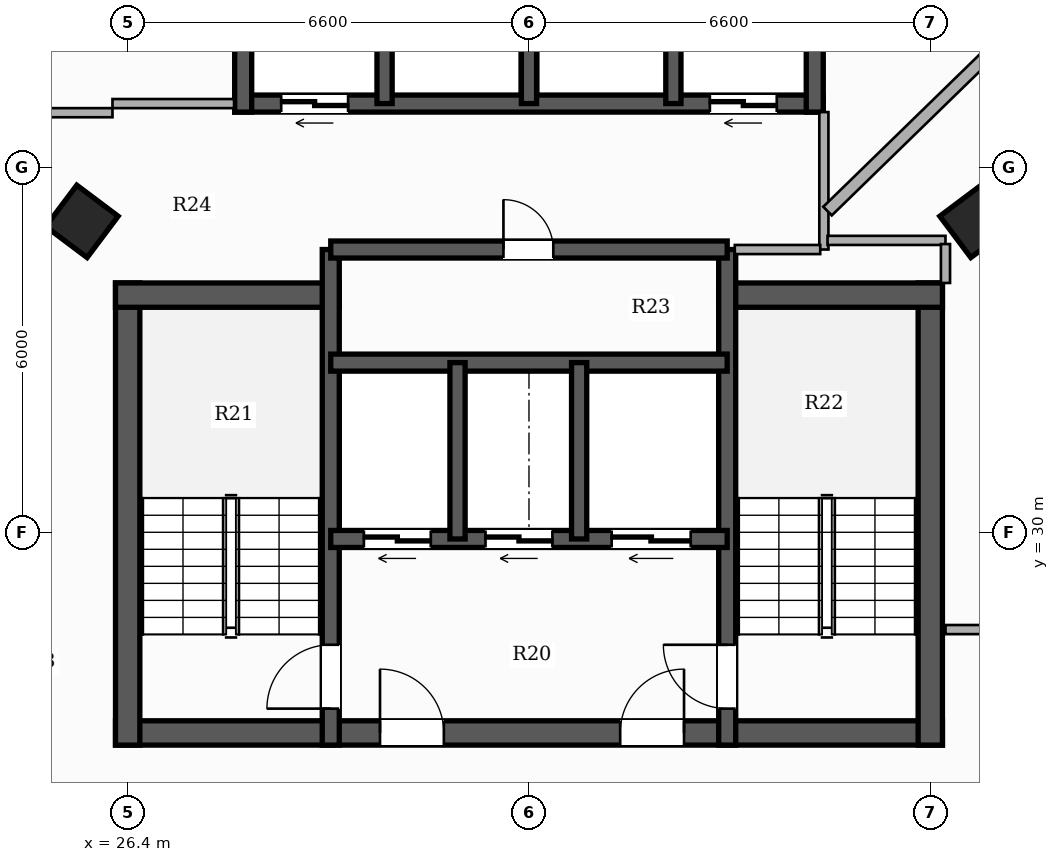
"""IFC4 building model, lengths in metres.
Left out: names, types, materials, properties, quantities, classifications, styles, units other than length and angle.
Written with IfcOpenShell. Run it as: python <this file> out.ifc"""

import sys

from ifc_helpers import new_model, si_unit, direction, frame, frame_2d, origin, origin_2d, place, context, subcontext, project, spatial, rectangle, hollow_rectangle, extrude, element, fill, save


model = new_model("IFC4")
c1 = context("Model", 3, precision=1e-05, world=origin(), true_north=direction((0.0, 1.0)))
c2 = subcontext(c1, "Body", "Model", "MODEL_VIEW")
j1 = project(units=[si_unit("LENGTHUNIT", "METRE"), si_unit("PLANEANGLEUNIT", "RADIAN")], contexts=[c1])
p1 = place(None, origin())
s1 = spatial("IfcSite", under=j1, at=p1, CompositionType="ELEMENT")
p2 = place(p1, origin())
s2 = spatial("IfcBuilding", under=s1, at=p2, CompositionType="ELEMENT")
p3 = place(p2, frame((0.0, 0.0, 113.3)))
s3 = spatial("IfcBuildingStorey", under=s2, at=p3, CompositionType="ELEMENT", Elevation=113.3)
p4 = place(p3, frame((26.2, 26.7, 0.0), z_axis=(0.0, 0.0, 1.0), x_axis=(1.0, 0.0, 0.0)))
e1 = element("IfcWall", 1, at=p4, inside=s3, PredefinedType="SHEAR", context=c2, shape_type="SweptSolid", body=[
    extrude(rectangle(XDim=13.6, YDim=0.4, at=frame_2d((6.8, 0.0))), origin(), (0.0, 0.0, 1.0), 3.3),
])
p5 = place(p4, frame((4.35, 0.0, 0.0)))
e2 = element("IfcOpeningElement", 2, at=p5, cuts=e1, PredefinedType="OPENING", context=c2, shape_type="SweptSolid", body=[
    extrude(rectangle(XDim=1.05, YDim=2.15, at=frame_2d((0.525, 1.075))), frame((0.0, 0.21, 0.0), z_axis=(0.0, -1.0, 0.0), x_axis=(1.0, 0.0, 0.0)), (0.0, 0.0, 1.0), 0.42),
])
p6 = place(p4, frame((8.3, 0.0, 0.0)))
e3 = element("IfcOpeningElement", 3, at=p6, cuts=e1, PredefinedType="OPENING", context=c2, shape_type="SweptSolid", body=[
    extrude(rectangle(XDim=1.05, YDim=2.15, at=frame_2d((0.525, 1.075))), frame((0.0, 0.21, 0.0), z_axis=(0.0, -1.0, 0.0), x_axis=(1.0, 0.0, 0.0)), (0.0, 0.0, 1.0), 0.42),
])
p7 = place(p3, frame((26.4, 26.5, 0.0), z_axis=(0.0, 0.0, 1.0), x_axis=(0.0, 1.0, 0.0)))
e4 = element("IfcWall", 4, at=p7, inside=s3, PredefinedType="SHEAR", context=c2, shape_type="SweptSolid", body=[
    extrude(rectangle(XDim=7.6, YDim=0.4, at=frame_2d((3.8, 0.0))), origin(), (0.0, 0.0, 1.0), 3.3),
])
p8 = place(p3, frame((26.2, 33.9, 0.0), z_axis=(0.0, 0.0, 1.0), x_axis=(1.0, 0.0, 0.0)))
e5 = element("IfcWall", 5, at=p8, inside=s3, PredefinedType="SHEAR", context=c2, shape_type="SweptSolid", body=[
    extrude(rectangle(XDim=3.68, YDim=0.4, at=frame_2d((1.84, 0.0))), origin(), (0.0, 0.0, 1.0), 3.3),
])
p9 = place(p3, frame((39.6, 26.5, 0.0), z_axis=(0.0, 0.0, 1.0), x_axis=(0.0, 1.0, 0.0)))
e6 = element("IfcWall", 6, at=p9, inside=s3, PredefinedType="SHEAR", context=c2, shape_type="SweptSolid", body=[
    extrude(rectangle(XDim=7.6, YDim=0.4, at=frame_2d((3.8, 0.0))), origin(), (0.0, 0.0, 1.0), 3.3),
])
p10 = place(p3, frame((36.12, 33.9, 0.0), z_axis=(0.0, 0.0, 1.0), x_axis=(1.0, 0.0, 0.0)))
e7 = element("IfcWall", 7, at=p10, inside=s3, PredefinedType="SHEAR", context=c2, shape_type="SweptSolid", body=[
    extrude(rectangle(XDim=3.68, YDim=0.4, at=frame_2d((1.84, 0.0))), origin(), (0.0, 0.0, 1.0), 3.3),
])
p11 = place(p3, frame((29.74, 26.5, 0.0), z_axis=(0.0, 0.0, 1.0), x_axis=(0.0, 1.0, 0.0)))
e8 = element("IfcWall", 8, at=p11, inside=s3, PredefinedType="SHEAR", context=c2, shape_type="SweptSolid", body=[
    extrude(rectangle(XDim=8.15, YDim=0.28, at=frame_2d((4.075, 0.0))), origin(), (0.0, 0.0, 1.0), 3.3),
])
p12 = place(p11, frame((0.6, 0.0, 0.0)))
e9 = element("IfcOpeningElement", 9, at=p12, cuts=e8, PredefinedType="OPENING", context=c2, shape_type="SweptSolid", body=[
    extrude(rectangle(XDim=1.05, YDim=2.15, at=frame_2d((0.525, 1.075))), frame((0.0, 0.15, 0.0), z_axis=(0.0, -1.0, 0.0), x_axis=(1.0, 0.0, 0.0)), (0.0, 0.0, 1.0), 0.3),
])
p13 = place(p3, frame((36.26, 26.5, 0.0), z_axis=(0.0, 0.0, 1.0), x_axis=(0.0, 1.0, 0.0)))
e10 = element("IfcWall", 10, at=p13, inside=s3, PredefinedType="SHEAR", context=c2, shape_type="SweptSolid", body=[
    extrude(rectangle(XDim=8.15, YDim=0.28, at=frame_2d((4.075, 0.0))), origin(), (0.0, 0.0, 1.0), 3.3),
])
p14 = place(p13, frame((0.6, 0.0, 0.0)))
e11 = element("IfcOpeningElement", 11, at=p14, cuts=e10, PredefinedType="OPENING", context=c2, shape_type="SweptSolid", body=[
    extrude(rectangle(XDim=1.05, YDim=2.15, at=frame_2d((0.525, 1.075))), frame((0.0, 0.15, 0.0), z_axis=(0.0, -1.0, 0.0), x_axis=(1.0, 0.0, 0.0)), (0.0, 0.0, 1.0), 0.3),
])
p15 = place(p3, frame((36.26, 29.89, 0.0), z_axis=(0.0, 0.0, 1.0), x_axis=(-1.0, 0.0, 0.0)))
e12 = element("IfcWall", 12, at=p15, inside=s3, PredefinedType="SHEAR", context=c2, shape_type="SweptSolid", body=[
    extrude(rectangle(XDim=6.52, YDim=0.28, at=frame_2d((3.26, 0.0))), origin(), (0.0, 0.0, 1.0), 3.3),
])
p16 = place(p15, frame((4.875, 0.0, 0.0)))
e13 = element("IfcOpeningElement", 13, at=p16, cuts=e12, PredefinedType="OPENING", context=c2, shape_type="SweptSolid", body=[
    extrude(rectangle(XDim=1.1, YDim=2.2, at=frame_2d((0.55, 1.1))), frame((0.0, 0.15, 0.0), z_axis=(0.0, -1.0, 0.0), x_axis=(1.0, 0.0, 0.0)), (0.0, 0.0, 1.0), 0.3),
])
p17 = place(p15, frame((2.875, 0.0, 0.0)))
e14 = element("IfcOpeningElement", 14, at=p17, cuts=e12, PredefinedType="OPENING", context=c2, shape_type="SweptSolid", body=[
    extrude(rectangle(XDim=1.1, YDim=2.2, at=frame_2d((0.55, 1.1))), frame((0.0, 0.15, 0.0), z_axis=(0.0, -1.0, 0.0), x_axis=(1.0, 0.0, 0.0)), (0.0, 0.0, 1.0), 0.3),
])
p18 = place(p15, frame((0.6, 0.0, 0.0)))
e15 = element("IfcOpeningElement", 15, at=p18, cuts=e12, PredefinedType="OPENING", context=c2, shape_type="SweptSolid", body=[
    extrude(rectangle(XDim=1.3, YDim=2.2, at=frame_2d((0.65, 1.1))), frame((0.0, 0.15, 0.0), z_axis=(0.0, -1.0, 0.0), x_axis=(1.0, 0.0, 0.0)), (0.0, 0.0, 1.0), 0.3),
])
p19 = place(p3, frame((29.74, 32.79, 0.0), z_axis=(0.0, 0.0, 1.0), x_axis=(1.0, 0.0, 0.0)))
e16 = element("IfcWall", 16, at=p19, inside=s3, PredefinedType="SHEAR", context=c2, shape_type="SweptSolid", body=[
    extrude(rectangle(XDim=6.52, YDim=0.28, at=frame_2d((3.26, 0.0))), origin(), (0.0, 0.0, 1.0), 3.3),
])
for number, where, z_axis, x_axis in (
    (17, (31.825, 29.89, 0.0), (0.0, 0.0, 1.0), (0.0, 1.0, 0.0)),
    (18, (33.825, 29.89, 0.0), (0.0, 0.0, 1.0), (0.0, 1.0, 0.0)),
):
    element("IfcWall", number, at=place(p3, frame(where, z_axis=z_axis, x_axis=x_axis)), inside=s3, PredefinedType="SHEAR", context=c2, shape_type="SweptSolid", body=[
        extrude(rectangle(XDim=2.9, YDim=0.25, at=frame_2d((1.45, 0.0))), origin(), (0.0, 0.0, 1.0), 3.3),
    ])
p20 = place(p3, frame((29.74, 34.65, 0.0), z_axis=(0.0, 0.0, 1.0), x_axis=(1.0, 0.0, 0.0)))
e19 = element("IfcWall", 19, at=p20, inside=s3, PredefinedType="SHEAR", context=c2, shape_type="SweptSolid", body=[
    extrude(rectangle(XDim=6.52, YDim=0.28, at=frame_2d((3.26, 0.0))), origin(), (0.0, 0.0, 1.0), 3.3),
])
p21 = place(p20, frame((2.84, 0.0, 0.0)))
e20 = element("IfcOpeningElement", 20, at=p21, cuts=e19, PredefinedType="OPENING", context=c2, shape_type="SweptSolid", body=[
    extrude(rectangle(XDim=0.82, YDim=2.1, at=frame_2d((0.41, 1.05))), frame((0.0, 0.15, 0.0), z_axis=(0.0, -1.0, 0.0), x_axis=(1.0, 0.0, 0.0)), (0.0, 0.0, 1.0), 0.3),
])
p22 = place(p3, frame((37.84, 37.05, 0.0), z_axis=(0.0, 0.0, 1.0), x_axis=(-1.0, 0.0, 0.0)))
e21 = element("IfcWall", 21, at=p22, inside=s3, PredefinedType="SHEAR", context=c2, shape_type="SweptSolid", body=[
    extrude(rectangle(XDim=9.68, YDim=0.28, at=frame_2d((4.84, 0.0))), origin(), (0.0, 0.0, 1.0), 3.3),
])
p23 = place(p22, frame((7.815, 0.0, 0.0)))
e22 = element("IfcOpeningElement", 22, at=p23, cuts=e21, PredefinedType="OPENING", context=c2, shape_type="SweptSolid", body=[
    extrude(rectangle(XDim=1.1, YDim=2.2, at=frame_2d((0.55, 1.1))), frame((0.0, 0.15, 0.0), z_axis=(0.0, -1.0, 0.0), x_axis=(1.0, 0.0, 0.0)), (0.0, 0.0, 1.0), 0.3),
])
p24 = place(p22, frame((0.765, 0.0, 0.0)))
e23 = element("IfcOpeningElement", 23, at=p24, cuts=e21, PredefinedType="OPENING", context=c2, shape_type="SweptSolid", body=[
    extrude(rectangle(XDim=1.1, YDim=2.2, at=frame_2d((0.55, 1.1))), frame((0.0, 0.15, 0.0), z_axis=(0.0, -1.0, 0.0), x_axis=(1.0, 0.0, 0.0)), (0.0, 0.0, 1.0), 0.3),
])
for number, where, z_axis, x_axis in (
    (24, (28.3, 36.91, 0.0), (0.0, 0.0, 1.0), (0.0, 1.0, 0.0)),
    (25, (37.7, 36.91, 0.0), (0.0, 0.0, 1.0), (0.0, 1.0, 0.0)),
):
    element("IfcWall", number, at=place(p3, frame(where, z_axis=z_axis, x_axis=x_axis)), inside=s3, PredefinedType="SHEAR", context=c2, shape_type="SweptSolid", body=[
        extrude(rectangle(XDim=2.83, YDim=0.28, at=frame_2d((1.415, 0.0))), origin(), (0.0, 0.0, 1.0), 3.3),
    ])
for number, where, z_axis, x_axis in (
    (26, (30.625, 37.05, 0.0), (0.0, 0.0, 1.0), (0.0, 1.0, 0.0)),
    (27, (33.0, 37.05, 0.0), (0.0, 0.0, 1.0), (0.0, 1.0, 0.0)),
    (28, (35.375, 37.05, 0.0), (0.0, 0.0, 1.0), (0.0, 1.0, 0.0)),
):
    element("IfcWall", number, at=place(p3, frame(where, z_axis=z_axis, x_axis=x_axis)), inside=s3, PredefinedType="SHEAR", context=c2, shape_type="SweptSolid", body=[
        extrude(rectangle(XDim=2.55, YDim=0.25, at=frame_2d((1.275, 0.0))), origin(), (0.0, 0.0, 1.0), 3.3),
    ])
for number, where, z_axis, x_axis in (
    (29, (25.648, 35.113, 0.0), (0.0, 0.0, 1.0), (0.6, 0.8, 0.0)),
    (30, (40.352, 35.113, 0.0), (0.0, 0.0, 1.0), (-0.6, 0.8, 0.0)),
):
    element("IfcColumn", number, at=place(p3, frame(where, z_axis=z_axis, x_axis=x_axis)), inside=s3, PredefinedType="COLUMN", context=c2, shape_type="SweptSolid", body=[
        extrude(hollow_rectangle(XDim=0.85, YDim=0.85, WallThickness=0.028, at=origin_2d()), origin(), (0.0, 0.0, 1.0), 3.3),
    ])
p25 = place(p3, frame((37.85, 34.65, 0.0), z_axis=(0.0, 0.0, 1.0), x_axis=(0.0, 1.0, 0.0)))
e31 = element("IfcWall", 31, at=p25, inside=s3, PredefinedType="PARTITIONING", context=c2, shape_type="SweptSolid", body=[
    extrude(rectangle(XDim=2.26, YDim=0.15, at=frame_2d((1.13, 0.0))), origin(), (0.0, 0.0, 1.0), 3.06),
])
p26 = place(p3, frame((36.385, 34.65, 0.0), z_axis=(0.0, 0.0, 1.0), x_axis=(1.0, 0.0, 0.0)))
e32 = element("IfcWall", 32, at=p26, inside=s3, PredefinedType="PARTITIONING", context=c2, shape_type="SweptSolid", body=[
    extrude(rectangle(XDim=1.405, YDim=0.15, at=frame_2d((0.703, 0.0))), origin(), (0.0, 0.0, 1.0), 2.425),
])
p27 = place(p3, frame((23.56, 36.9, 0.0), z_axis=(0.0, 0.0, 1.0), x_axis=(1.0, 0.0, 0.0)))
e33 = element("IfcWall", 33, at=p27, inside=s3, PredefinedType="PARTITIONING", context=c2, shape_type="SweptSolid", body=[
    extrude(rectangle(XDim=2.59, YDim=0.15, at=frame_2d((1.295, 0.0))), origin(), (0.0, 0.0, 1.0), 2.413),
])
p28 = place(p27, frame((0.515, 0.0, 0.0)))
e34 = element("IfcOpeningElement", 34, at=p28, cuts=e33, PredefinedType="OPENING", context=c2, shape_type="SweptSolid", body=[
    extrude(rectangle(XDim=0.88, YDim=2.1, at=frame_2d((0.44, 1.05))), frame((0.0, 0.085, 0.0), z_axis=(0.0, -1.0, 0.0), x_axis=(1.0, 0.0, 0.0)), (0.0, 0.0, 1.0), 0.17),
])
p29 = place(p3, frame((39.85, 28.4, 0.0), z_axis=(0.0, 0.0, 1.0), x_axis=(1.0, 0.0, 0.0)))
e35 = element("IfcWall", 35, at=p29, inside=s3, PredefinedType="PARTITIONING", context=c2, shape_type="SweptSolid", body=[
    extrude(rectangle(XDim=2.5, YDim=0.15, at=frame_2d((1.25, 0.0))), origin(), (0.0, 0.0, 1.0), 2.721),
])
p30 = place(p3, frame((26.15, 37.05, 0.0), z_axis=(0.0, 0.0, 1.0), x_axis=(1.0, 0.0, 0.0)))
e36 = element("IfcWall", 36, at=p30, inside=s3, PredefinedType="PARTITIONING", context=c2, shape_type="SweptSolid", body=[
    extrude(rectangle(XDim=2.0, YDim=0.15, at=frame_2d((1.0, 0.0))), origin(), (0.0, 0.0, 1.0), 2.413),
])
p31 = place(p3, frame((37.91, 34.8, 0.0), z_axis=(0.0, 0.0, 1.0), x_axis=(1.0, 0.0, 0.0)))
e37 = element("IfcWall", 37, at=p31, inside=s3, PredefinedType="PARTITIONING", context=c2, shape_type="SweptSolid", body=[
    extrude(rectangle(XDim=1.94, YDim=0.15, at=frame_2d((0.97, 0.0))), origin(), (0.0, 0.0, 1.0), 2.721),
])
p32 = place(p3, frame((39.85, 34.74, 0.0), z_axis=(0.0, 0.0, 1.0), x_axis=(0.0, -1.0, 0.0)))
e38 = element("IfcWall", 38, at=p32, inside=s3, PredefinedType="PARTITIONING", context=c2, shape_type="SweptSolid", body=[
    extrude(rectangle(XDim=0.64, YDim=0.15, at=frame_2d((0.32, 0.0))), origin(), (0.0, 0.0, 1.0), 2.721),
])
p33 = place(p3, frame((37.91, 35.282, 0.0), z_axis=(0.0, 0.0, 1.0), x_axis=(0.716392659664, 0.697697324905, 0.0)))
e39 = element("IfcWall", 39, at=p33, inside=s3, PredefinedType="PARTITIONING", context=c2, shape_type="SweptSolid", body=[
    extrude(rectangle(XDim=6.216, YDim=0.2, at=frame_2d((3.108, 0.0))), origin(), (0.0, 0.0, 1.0), 2.413),
])
p34 = place(p12, origin())
e40 = element("IfcDoor", 40, at=p34, inside=s3, OperationType="SINGLE_SWING_LEFT", PredefinedType="DOOR", context=c2, shape_type="SweptSolid", body=[
    extrude(rectangle(XDim=1.05, YDim=2.15, at=frame_2d((0.525, 1.075))), frame((0.0, 0.025, 0.0), z_axis=(0.0, -1.0, 0.0), x_axis=(1.0, 0.0, 0.0)), (0.0, 0.0, 1.0), 0.05),
])
fill(e9, e40)
p35 = place(p14, origin())
e41 = element("IfcDoor", 41, at=p35, inside=s3, OperationType="SINGLE_SWING_RIGHT", PredefinedType="DOOR", context=c2, shape_type="SweptSolid", body=[
    extrude(rectangle(XDim=1.05, YDim=2.15, at=frame_2d((0.525, 1.075))), frame((0.0, 0.025, 0.0), z_axis=(0.0, -1.0, 0.0), x_axis=(1.0, 0.0, 0.0)), (0.0, 0.0, 1.0), 0.05),
])
fill(e11, e41)
p36 = place(p5, origin())
e42 = element("IfcDoor", 42, at=p36, inside=s3, OperationType="SINGLE_SWING_LEFT", PredefinedType="DOOR", context=c2, shape_type="SweptSolid", body=[
    extrude(rectangle(XDim=1.05, YDim=2.15, at=frame_2d((0.525, 1.075))), frame((0.0, 0.025, 0.0), z_axis=(0.0, -1.0, 0.0), x_axis=(1.0, 0.0, 0.0)), (0.0, 0.0, 1.0), 0.05),
])
fill(e2, e42)
p37 = place(p6, origin())
e43 = element("IfcDoor", 43, at=p37, inside=s3, OperationType="SINGLE_SWING_RIGHT", PredefinedType="DOOR", context=c2, shape_type="SweptSolid", body=[
    extrude(rectangle(XDim=1.05, YDim=2.15, at=frame_2d((0.525, 1.075))), frame((0.0, 0.025, 0.0), z_axis=(0.0, -1.0, 0.0), x_axis=(1.0, 0.0, 0.0)), (0.0, 0.0, 1.0), 0.05),
])
fill(e3, e43)
p38 = place(p16, origin())
e44 = element("IfcDoor", 44, at=p38, inside=s3, OperationType="DOUBLE_DOOR_SLIDING", PredefinedType="DOOR", context=c2, shape_type="SweptSolid", body=[
    extrude(rectangle(XDim=1.1, YDim=2.2, at=frame_2d((0.55, 1.1))), frame((0.0, 0.025, 0.0), z_axis=(0.0, -1.0, 0.0), x_axis=(1.0, 0.0, 0.0)), (0.0, 0.0, 1.0), 0.05),
])
fill(e13, e44)
p39 = place(p17, origin())
e45 = element("IfcDoor", 45, at=p39, inside=s3, OperationType="DOUBLE_DOOR_SLIDING", PredefinedType="DOOR", context=c2, shape_type="SweptSolid", body=[
    extrude(rectangle(XDim=1.1, YDim=2.2, at=frame_2d((0.55, 1.1))), frame((0.0, 0.025, 0.0), z_axis=(0.0, -1.0, 0.0), x_axis=(1.0, 0.0, 0.0)), (0.0, 0.0, 1.0), 0.05),
])
fill(e14, e45)
p40 = place(p18, origin())
e46 = element("IfcDoor", 46, at=p40, inside=s3, OperationType="DOUBLE_DOOR_SLIDING", PredefinedType="DOOR", context=c2, shape_type="SweptSolid", body=[
    extrude(rectangle(XDim=1.3, YDim=2.2, at=frame_2d((0.65, 1.1))), frame((0.0, 0.025, 0.0), z_axis=(0.0, -1.0, 0.0), x_axis=(1.0, 0.0, 0.0)), (0.0, 0.0, 1.0), 0.05),
])
fill(e15, e46)
p41 = place(p23, origin())
e47 = element("IfcDoor", 47, at=p41, inside=s3, OperationType="DOUBLE_DOOR_SLIDING", PredefinedType="DOOR", context=c2, shape_type="SweptSolid", body=[
    extrude(rectangle(XDim=1.1, YDim=2.2, at=frame_2d((0.55, 1.1))), frame((0.0, 0.025, 0.0), z_axis=(0.0, -1.0, 0.0), x_axis=(1.0, 0.0, 0.0)), (0.0, 0.0, 1.0), 0.05),
])
fill(e22, e47)
p42 = place(p24, origin())
e48 = element("IfcDoor", 48, at=p42, inside=s3, OperationType="DOUBLE_DOOR_SLIDING", PredefinedType="DOOR", context=c2, shape_type="SweptSolid", body=[
    extrude(rectangle(XDim=1.1, YDim=2.2, at=frame_2d((0.55, 1.1))), frame((0.0, 0.025, 0.0), z_axis=(0.0, -1.0, 0.0), x_axis=(1.0, 0.0, 0.0)), (0.0, 0.0, 1.0), 0.05),
])
fill(e23, e48)
p43 = place(p21, origin())
e49 = element("IfcDoor", 49, at=p43, inside=s3, OperationType="SINGLE_SWING_LEFT", PredefinedType="DOOR", context=c2, shape_type="SweptSolid", body=[
    extrude(rectangle(XDim=0.82, YDim=2.1, at=frame_2d((0.41, 1.05))), frame((0.0, 0.025, 0.0), z_axis=(0.0, -1.0, 0.0), x_axis=(1.0, 0.0, 0.0)), (0.0, 0.0, 1.0), 0.05),
])
fill(e20, e49)
save(model, sys.argv[1])
